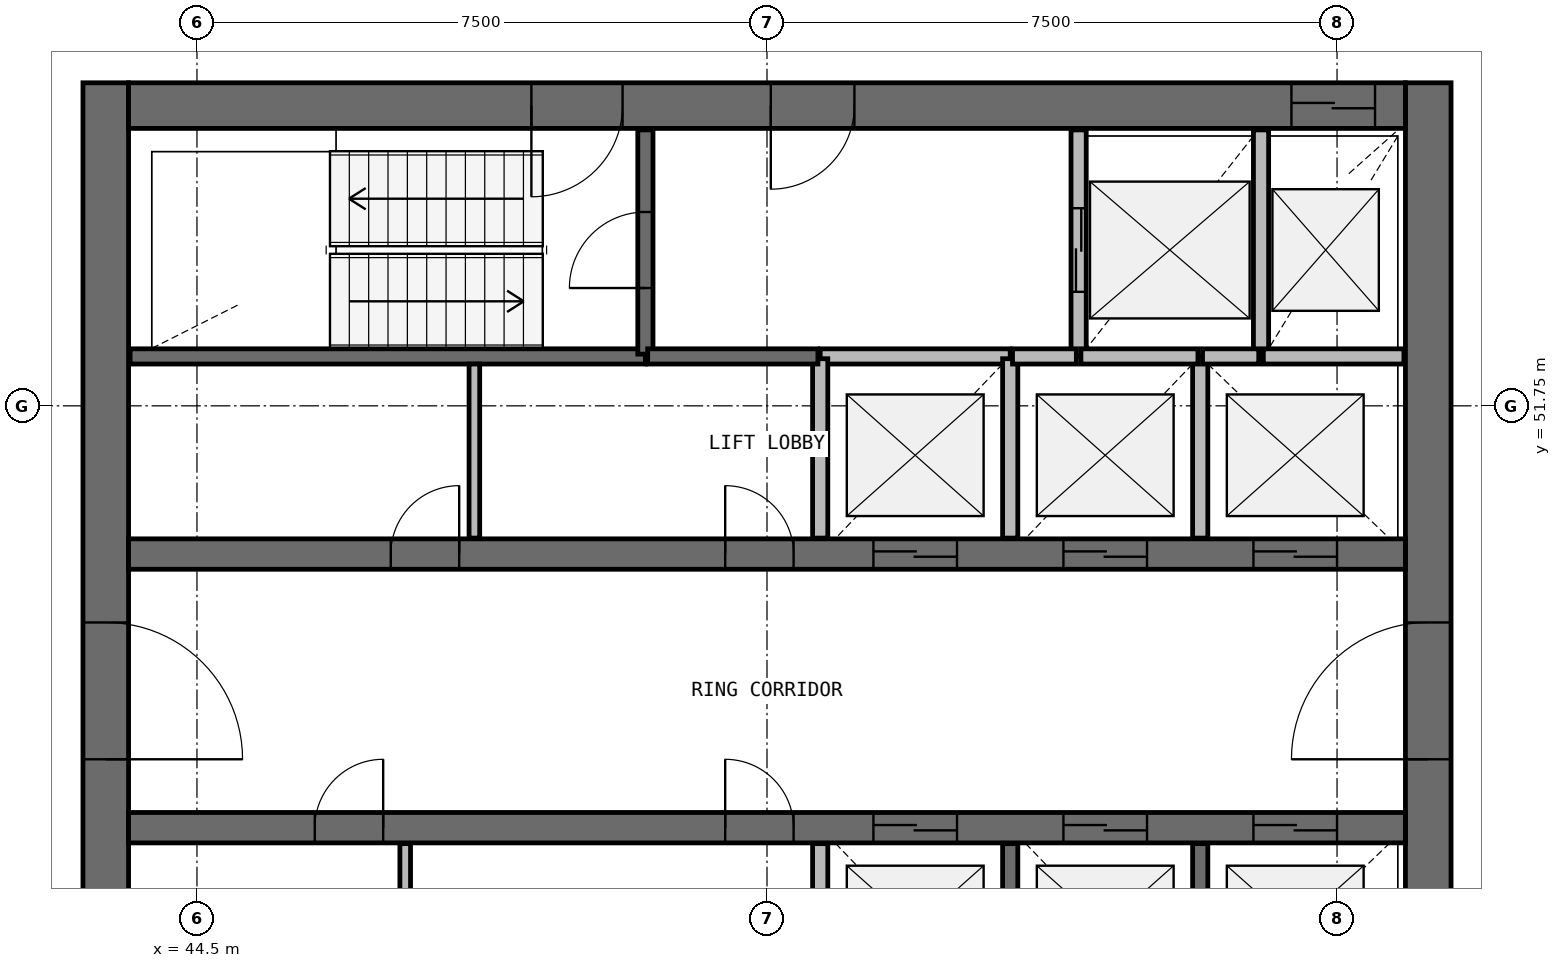
"""IFC4 building model, lengths in metres.
Left out: names, types, materials, properties, quantities, classifications, styles, units other than length and angle.
Written with IfcOpenShell. Run it as: python <this file> out.ifc"""

import sys

from ifc_helpers import new_model, si_unit, direction, frame, frame_2d, origin, place, context, subcontext, project, spatial, rectangle, extrude, source, transform, mapped, element, fill, save


model = new_model("IFC4")
c1 = context("Model", 3, precision=1e-05, world=origin(), true_north=direction((0.0, 1.0)))
c2 = subcontext(c1, "Body", "Model", "MODEL_VIEW")
j1 = project(units=[si_unit("LENGTHUNIT", "METRE"), si_unit("PLANEANGLEUNIT", "RADIAN")], contexts=[c1])
p1 = place(None, origin())
s1 = spatial("IfcSite", under=j1, at=p1, CompositionType="ELEMENT")
p2 = place(p1, origin())
s2 = spatial("IfcBuilding", under=s1, at=p2, CompositionType="ELEMENT")
p3 = place(p2, frame((0.0, 0.0, 250.1)))
s3 = spatial("IfcBuildingStorey", under=s2, at=p3, CompositionType="ELEMENT", Elevation=250.1)
p4 = place(p3, frame((60.7, 40.0, 0.0), z_axis=(0.0, 0.0, 1.0), x_axis=(0.0, 1.0, 0.0)))
e1 = element("IfcWall", 1, at=p4, inside=s3, PredefinedType="SHEAR", context=c2, shape_type="SweptSolid", body=[
    extrude(rectangle(XDim=16.0, YDim=0.6, at=frame_2d((8.0, 0.0))), origin(), (0.0, 0.0, 1.0), 3.9),
])
p5 = place(p4, frame((7.1, 0.0, 0.0)))
e2 = element("IfcOpeningElement", 2, at=p5, cuts=e1, PredefinedType="OPENING", context=c2, shape_type="SweptSolid", body=[
    extrude(rectangle(XDim=1.8, YDim=2.1, at=frame_2d((0.9, 1.05))), frame((0.0, 0.31, 0.0), z_axis=(0.0, -1.0, 0.0), x_axis=(1.0, 0.0, 0.0)), (0.0, 0.0, 1.0), 0.62),
])
p6 = place(p3, frame((43.3, 56.0, 0.0), z_axis=(0.0, 0.0, 1.0), x_axis=(0.0, -1.0, 0.0)))
e3 = element("IfcWall", 3, at=p6, inside=s3, PredefinedType="SHEAR", context=c2, shape_type="SweptSolid", body=[
    extrude(rectangle(XDim=16.0, YDim=0.6, at=frame_2d((8.0, 0.0))), origin(), (0.0, 0.0, 1.0), 3.9),
])
p7 = place(p6, frame((7.1, 0.0, 0.0)))
e4 = element("IfcOpeningElement", 4, at=p7, cuts=e3, PredefinedType="OPENING", context=c2, shape_type="SweptSolid", body=[
    extrude(rectangle(XDim=1.8, YDim=2.1, at=frame_2d((0.9, 1.05))), frame((0.0, 0.31, 0.0), z_axis=(0.0, -1.0, 0.0), x_axis=(1.0, 0.0, 0.0)), (0.0, 0.0, 1.0), 0.62),
])
p8 = place(p3, frame((60.4, 55.7, 0.0), z_axis=(0.0, 0.0, 1.0), x_axis=(-1.0, 0.0, 0.0)))
e5 = element("IfcWall", 5, at=p8, inside=s3, PredefinedType="SHEAR", context=c2, shape_type="SweptSolid", body=[
    extrude(rectangle(XDim=16.8, YDim=0.6, at=frame_2d((8.4, 0.0))), origin(), (0.0, 0.0, 1.0), 3.9),
])
p9 = place(p8, frame((0.4, 0.0, 0.0)))
e6 = element("IfcOpeningElement", 6, at=p9, cuts=e5, PredefinedType="OPENING", context=c2, shape_type="SweptSolid", body=[
    extrude(rectangle(XDim=1.1, YDim=2.1, at=frame_2d((0.55, 1.05))), frame((0.0, 0.31, 0.0), z_axis=(0.0, -1.0, 0.0), x_axis=(1.0, 0.0, 0.0)), (0.0, 0.0, 1.0), 0.62),
])
p10 = place(p8, frame((10.3, 0.0, 0.0)))
e7 = element("IfcOpeningElement", 7, at=p10, cuts=e5, PredefinedType="OPENING", context=c2, shape_type="SweptSolid", body=[
    extrude(rectangle(XDim=1.2, YDim=2.1, at=frame_2d((0.6, 1.05))), frame((0.0, 0.31, 0.0), z_axis=(0.0, -1.0, 0.0), x_axis=(1.0, 0.0, 0.0)), (0.0, 0.0, 1.0), 0.62),
])
p11 = place(p8, frame((7.25, 0.0, 0.0)))
e8 = element("IfcOpeningElement", 8, at=p11, cuts=e5, PredefinedType="OPENING", context=c2, shape_type="SweptSolid", body=[
    extrude(rectangle(XDim=1.1, YDim=2.1, at=frame_2d((0.55, 1.05))), frame((0.0, 0.31, 0.0), z_axis=(0.0, -1.0, 0.0), x_axis=(1.0, 0.0, 0.0)), (0.0, 0.0, 1.0), 0.62),
])
p12 = place(p3, frame((43.6, 49.8, 0.0), z_axis=(0.0, 0.0, 1.0), x_axis=(1.0, 0.0, 0.0)))
e9 = element("IfcWall", 9, at=p12, inside=s3, PredefinedType="SHEAR", context=c2, shape_type="SweptSolid", body=[
    extrude(rectangle(XDim=16.8, YDim=0.4, at=frame_2d((8.4, 0.0))), origin(), (0.0, 0.0, 1.0), 3.9),
])
p13 = place(p12, frame((9.8, 0.0, 0.0)))
e10 = element("IfcOpeningElement", 10, at=p13, cuts=e9, PredefinedType="OPENING", context=c2, shape_type="SweptSolid", body=[
    extrude(rectangle(XDim=1.1, YDim=2.1, at=frame_2d((0.55, 1.05))), frame((0.0, 0.21, 0.0), z_axis=(0.0, -1.0, 0.0), x_axis=(1.0, 0.0, 0.0)), (0.0, 0.0, 1.0), 0.42),
])
p14 = place(p12, frame((12.3, 0.0, 0.0)))
e11 = element("IfcOpeningElement", 11, at=p14, cuts=e9, PredefinedType="OPENING", context=c2, shape_type="SweptSolid", body=[
    extrude(rectangle(XDim=1.1, YDim=2.1, at=frame_2d((0.55, 1.05))), frame((0.0, 0.21, 0.0), z_axis=(0.0, -1.0, 0.0), x_axis=(1.0, 0.0, 0.0)), (0.0, 0.0, 1.0), 0.42),
])
p15 = place(p12, frame((14.8, 0.0, 0.0)))
e12 = element("IfcOpeningElement", 12, at=p15, cuts=e9, PredefinedType="OPENING", context=c2, shape_type="SweptSolid", body=[
    extrude(rectangle(XDim=1.1, YDim=2.1, at=frame_2d((0.55, 1.05))), frame((0.0, 0.21, 0.0), z_axis=(0.0, -1.0, 0.0), x_axis=(1.0, 0.0, 0.0)), (0.0, 0.0, 1.0), 0.42),
])
p16 = place(p12, frame((3.45, 0.0, 0.0)))
e13 = element("IfcOpeningElement", 13, at=p16, cuts=e9, PredefinedType="OPENING", context=c2, shape_type="SweptSolid", body=[
    extrude(rectangle(XDim=0.9, YDim=2.1, at=frame_2d((0.45, 1.05))), frame((0.0, 0.21, 0.0), z_axis=(0.0, -1.0, 0.0), x_axis=(1.0, 0.0, 0.0)), (0.0, 0.0, 1.0), 0.42),
])
p17 = place(p12, frame((7.85, 0.0, 0.0)))
e14 = element("IfcOpeningElement", 14, at=p17, cuts=e9, PredefinedType="OPENING", context=c2, shape_type="SweptSolid", body=[
    extrude(rectangle(XDim=0.9, YDim=2.1, at=frame_2d((0.45, 1.05))), frame((0.0, 0.21, 0.0), z_axis=(0.0, -1.0, 0.0), x_axis=(1.0, 0.0, 0.0)), (0.0, 0.0, 1.0), 0.42),
])
p18 = place(p3, frame((43.6, 46.2, 0.0), z_axis=(0.0, 0.0, 1.0), x_axis=(1.0, 0.0, 0.0)))
e15 = element("IfcWall", 15, at=p18, inside=s3, PredefinedType="SHEAR", context=c2, shape_type="SweptSolid", body=[
    extrude(rectangle(XDim=16.8, YDim=0.4, at=frame_2d((8.4, 0.0))), origin(), (0.0, 0.0, 1.0), 3.9),
])
p19 = place(p18, frame((9.8, 0.0, 0.0)))
e16 = element("IfcOpeningElement", 16, at=p19, cuts=e15, PredefinedType="OPENING", context=c2, shape_type="SweptSolid", body=[
    extrude(rectangle(XDim=1.1, YDim=2.1, at=frame_2d((0.55, 1.05))), frame((0.0, 0.21, 0.0), z_axis=(0.0, -1.0, 0.0), x_axis=(1.0, 0.0, 0.0)), (0.0, 0.0, 1.0), 0.42),
])
p20 = place(p18, frame((12.3, 0.0, 0.0)))
e17 = element("IfcOpeningElement", 17, at=p20, cuts=e15, PredefinedType="OPENING", context=c2, shape_type="SweptSolid", body=[
    extrude(rectangle(XDim=1.1, YDim=2.1, at=frame_2d((0.55, 1.05))), frame((0.0, 0.21, 0.0), z_axis=(0.0, -1.0, 0.0), x_axis=(1.0, 0.0, 0.0)), (0.0, 0.0, 1.0), 0.42),
])
p21 = place(p18, frame((14.8, 0.0, 0.0)))
e18 = element("IfcOpeningElement", 18, at=p21, cuts=e15, PredefinedType="OPENING", context=c2, shape_type="SweptSolid", body=[
    extrude(rectangle(XDim=1.1, YDim=2.1, at=frame_2d((0.55, 1.05))), frame((0.0, 0.21, 0.0), z_axis=(0.0, -1.0, 0.0), x_axis=(1.0, 0.0, 0.0)), (0.0, 0.0, 1.0), 0.42),
])
p22 = place(p18, frame((2.45, 0.0, 0.0)))
e19 = element("IfcOpeningElement", 19, at=p22, cuts=e15, PredefinedType="OPENING", context=c2, shape_type="SweptSolid", body=[
    extrude(rectangle(XDim=0.9, YDim=2.1, at=frame_2d((0.45, 1.05))), frame((0.0, 0.21, 0.0), z_axis=(0.0, -1.0, 0.0), x_axis=(1.0, 0.0, 0.0)), (0.0, 0.0, 1.0), 0.42),
])
p23 = place(p18, frame((7.85, 0.0, 0.0)))
e20 = element("IfcOpeningElement", 20, at=p23, cuts=e15, PredefinedType="OPENING", context=c2, shape_type="SweptSolid", body=[
    extrude(rectangle(XDim=0.9, YDim=2.1, at=frame_2d((0.45, 1.05))), frame((0.0, 0.21, 0.0), z_axis=(0.0, -1.0, 0.0), x_axis=(1.0, 0.0, 0.0)), (0.0, 0.0, 1.0), 0.42),
])
p24 = place(p3, frame((43.62, 52.4, 0.0), z_axis=(0.0, 0.0, 1.0), x_axis=(1.0, 0.0, 0.0)))
e21 = element("IfcWall", 21, at=p24, inside=s3, PredefinedType="SOLIDWALL", context=c2, shape_type="SweptSolid", body=[
    extrude(rectangle(XDim=6.78, YDim=0.2, at=frame_2d((3.39, 0.0))), origin(), (0.0, 0.0, 1.0), 3.58),
])
p25 = place(p3, frame((50.4, 52.43, 0.0), z_axis=(0.0, 0.0, 1.0), x_axis=(0.0, 1.0, 0.0)))
e22 = element("IfcWall", 22, at=p25, inside=s3, PredefinedType="SOLIDWALL", context=c2, shape_type="SweptSolid", body=[
    extrude(rectangle(XDim=2.95, YDim=0.2, at=frame_2d((1.475, 0.0))), origin(), (0.0, 0.0, 1.0), 3.58),
])
p26 = place(p25, frame((0.87, 0.0, 0.0)))
e23 = element("IfcOpeningElement", 23, at=p26, cuts=e22, PredefinedType="OPENING", context=c2, shape_type="SweptSolid", body=[
    extrude(rectangle(XDim=1.0, YDim=2.1, at=frame_2d((0.5, 1.05))), frame((0.0, 0.11, 0.0), z_axis=(0.0, -1.0, 0.0), x_axis=(1.0, 0.0, 0.0)), (0.0, 0.0, 1.0), 0.22),
])
p27 = place(p3, frame((56.1, 55.38, 0.0), z_axis=(0.0, 0.0, 1.0), x_axis=(0.0, -1.0, 0.0)))
e24 = element("IfcWall", 24, at=p27, inside=s3, PredefinedType="SOLIDWALL", context=c2, shape_type="SweptSolid", body=[
    extrude(rectangle(XDim=2.98, YDim=0.2, at=frame_2d((1.49, 0.0))), origin(), (0.0, 0.0, 1.0), 3.58),
])
p28 = place(p27, frame((1.03, 0.0, 0.0)))
e25 = element("IfcOpeningElement", 25, at=p28, cuts=e24, PredefinedType="OPENING", context=c2, shape_type="SweptSolid", body=[
    extrude(rectangle(XDim=1.1, YDim=2.1, at=frame_2d((0.55, 1.05))), frame((0.0, 0.11, 0.0), z_axis=(0.0, -1.0, 0.0), x_axis=(1.0, 0.0, 0.0)), (0.0, 0.0, 1.0), 0.22),
])
p29 = place(p3, frame((58.5, 52.4, 0.0), z_axis=(0.0, 0.0, 1.0), x_axis=(0.0, 1.0, 0.0)))
e26 = element("IfcWall", 26, at=p29, inside=s3, PredefinedType="SOLIDWALL", context=c2, shape_type="SweptSolid", body=[
    extrude(rectangle(XDim=2.98, YDim=0.2, at=frame_2d((1.49, 0.0))), origin(), (0.0, 0.0, 1.0), 3.58),
])
p30 = place(p3, frame((55.2, 52.4, 0.0), z_axis=(0.0, 0.0, 1.0), x_axis=(-1.0, 0.0, 0.0)))
e27 = element("IfcWall", 27, at=p30, inside=s3, PredefinedType="SOLIDWALL", context=c2, shape_type="SweptSolid", body=[
    extrude(rectangle(XDim=2.5, YDim=0.2, at=frame_2d((1.25, 0.0))), origin(), (0.0, 0.0, 1.0), 3.58),
])
for number, where, z_axis, x_axis in (
    (28, (52.7, 45.99, 0.0), (0.0, 0.0, 1.0), (0.0, -1.0, 0.0)),
    (29, (52.7, 52.37, 0.0), (0.0, 0.0, 1.0), (0.0, -1.0, 0.0)),
    (30, (55.2, 43.63, 0.0), (0.0, 0.0, 1.0), (0.0, 1.0, 0.0)),
    (31, (55.2, 50.01, 0.0), (0.0, 0.0, 1.0), (0.0, 1.0, 0.0)),
    (32, (57.7, 43.63, 0.0), (0.0, 0.0, 1.0), (0.0, 1.0, 0.0)),
):
    element("IfcWall", number, at=place(p3, frame(where, z_axis=z_axis, x_axis=x_axis)), inside=s3, PredefinedType="SOLIDWALL", context=c2, shape_type="SweptSolid", body=[
        extrude(rectangle(XDim=2.36, YDim=0.2, at=frame_2d((1.18, 0.0))), origin(), (0.0, 0.0, 1.0), 3.58),
    ])
p31 = place(p3, frame((57.7, 50.01, 0.0), z_axis=(0.0, 0.0, 1.0), x_axis=(0.0, 1.0, 0.0)))
e33 = element("IfcWall", 33, at=p31, inside=s3, PredefinedType="SOLIDWALL", context=c2, shape_type="SweptSolid", body=[
    extrude(rectangle(XDim=2.39, YDim=0.2, at=frame_2d((1.195, 0.0))), origin(), (0.0, 0.0, 1.0), 3.58),
])
p32 = place(p3, frame((50.43, 52.4, 0.0), z_axis=(0.0, 0.0, 1.0), x_axis=(1.0, 0.0, 0.0)))
e34 = element("IfcWall", 34, at=p32, inside=s3, PredefinedType="SOLIDWALL", context=c2, shape_type="SweptSolid", body=[
    extrude(rectangle(XDim=2.24, YDim=0.2, at=frame_2d((1.12, 0.0))), origin(), (0.0, 0.0, 1.0), 3.58),
])
p33 = place(p3, frame((60.38, 52.4, 0.0), z_axis=(0.0, 0.0, 1.0), x_axis=(-1.0, 0.0, 0.0)))
e35 = element("IfcWall", 35, at=p33, inside=s3, PredefinedType="SOLIDWALL", context=c2, shape_type="SweptSolid", body=[
    extrude(rectangle(XDim=1.85, YDim=0.2, at=frame_2d((0.925, 0.0))), origin(), (0.0, 0.0, 1.0), 3.58),
])
p34 = place(p3, frame((57.67, 52.4, 0.0), z_axis=(0.0, 0.0, 1.0), x_axis=(-1.0, 0.0, 0.0)))
e36 = element("IfcWall", 36, at=p34, inside=s3, PredefinedType="SOLIDWALL", context=c2, shape_type="SweptSolid", body=[
    extrude(rectangle(XDim=1.54, YDim=0.2, at=frame_2d((0.77, 0.0))), origin(), (0.0, 0.0, 1.0), 3.58),
])
p35 = place(p3, frame((56.07, 52.4, 0.0), z_axis=(0.0, 0.0, 1.0), x_axis=(-1.0, 0.0, 0.0)))
e37 = element("IfcWall", 37, at=p35, inside=s3, PredefinedType="SOLIDWALL", context=c2, shape_type="SweptSolid", body=[
    extrude(rectangle(XDim=0.84, YDim=0.2, at=frame_2d((0.42, 0.0))), origin(), (0.0, 0.0, 1.0), 3.58),
])
p36 = place(p3, frame((58.47, 52.4, 0.0), z_axis=(0.0, 0.0, 1.0), x_axis=(-1.0, 0.0, 0.0)))
e38 = element("IfcWall", 38, at=p36, inside=s3, PredefinedType="SOLIDWALL", context=c2, shape_type="SweptSolid", body=[
    extrude(rectangle(XDim=0.74, YDim=0.2, at=frame_2d((0.37, 0.0))), origin(), (0.0, 0.0, 1.0), 3.58),
])
for number, where, z_axis, x_axis in (
    (39, (47.24, 43.7, 0.0), (0.0, 0.0, 1.0), (0.0, 1.0, 0.0)),
    (40, (48.15, 50.01, 0.0), (0.0, 0.0, 1.0), (0.0, 1.0, 0.0)),
):
    element("IfcWall", number, at=place(p3, frame(where, z_axis=z_axis, x_axis=x_axis)), inside=s3, PredefinedType="PARTITIONING", context=c2, shape_type="SweptSolid", body=[
        extrude(rectangle(XDim=2.29, YDim=0.14, at=frame_2d((1.145, 0.0))), origin(), (0.0, 0.0, 1.0), 2.88),
    ])
m1 = source(origin(), c2, "Body", "SweptSolid", [
    extrude(rectangle(XDim=1.8, YDim=2.1, at=frame_2d((0.9, 1.05))), frame((0.0, 0.025, 0.0), z_axis=(0.0, -1.0, 0.0), x_axis=(1.0, 0.0, 0.0)), (0.0, 0.0, 1.0), 0.05),
])
p37 = place(p7, origin())
e41 = element("IfcDoor", 41, at=p37, inside=s3, OperationType="SINGLE_SWING_RIGHT", PredefinedType="DOOR", context=c2, shape_type="MappedRepresentation", body=[
    mapped(m1, transform((0.0, 0.0, 0.0), scale=1.0)),
])
fill(e4, e41)
p38 = place(p5, origin())
e42 = element("IfcDoor", 42, at=p38, inside=s3, OperationType="SINGLE_SWING_LEFT", PredefinedType="DOOR", context=c2, shape_type="MappedRepresentation", body=[
    mapped(m1, transform((0.0, 0.0, 0.0), scale=1.0)),
])
fill(e2, e42)
m2 = source(origin(), c2, "Body", "SweptSolid", [
    extrude(rectangle(XDim=1.1, YDim=2.1, at=frame_2d((0.55, 1.05))), frame((0.0, 0.025, 0.0), z_axis=(0.0, -1.0, 0.0), x_axis=(1.0, 0.0, 0.0)), (0.0, 0.0, 1.0), 0.05),
])
p39 = place(p13, origin())
e43 = element("IfcDoor", 43, at=p39, inside=s3, OperationType="DOUBLE_DOOR_SLIDING", PredefinedType="USERDEFINED", context=c2, shape_type="MappedRepresentation", body=[
    mapped(m2, transform((0.0, 0.0, 0.0), scale=1.0)),
])
fill(e10, e43)
p40 = place(p14, origin())
e44 = element("IfcDoor", 44, at=p40, inside=s3, OperationType="DOUBLE_DOOR_SLIDING", PredefinedType="USERDEFINED", context=c2, shape_type="MappedRepresentation", body=[
    mapped(m2, transform((0.0, 0.0, 0.0), scale=1.0)),
])
fill(e11, e44)
p41 = place(p15, origin())
e45 = element("IfcDoor", 45, at=p41, inside=s3, OperationType="DOUBLE_DOOR_SLIDING", PredefinedType="USERDEFINED", context=c2, shape_type="MappedRepresentation", body=[
    mapped(m2, transform((0.0, 0.0, 0.0), scale=1.0)),
])
fill(e12, e45)
p42 = place(p19, origin())
e46 = element("IfcDoor", 46, at=p42, inside=s3, OperationType="DOUBLE_DOOR_SLIDING", PredefinedType="USERDEFINED", context=c2, shape_type="MappedRepresentation", body=[
    mapped(m2, transform((0.0, 0.0, 0.0), scale=1.0)),
])
fill(e16, e46)
p43 = place(p20, origin())
e47 = element("IfcDoor", 47, at=p43, inside=s3, OperationType="DOUBLE_DOOR_SLIDING", PredefinedType="USERDEFINED", context=c2, shape_type="MappedRepresentation", body=[
    mapped(m2, transform((0.0, 0.0, 0.0), scale=1.0)),
])
fill(e17, e47)
p44 = place(p21, origin())
e48 = element("IfcDoor", 48, at=p44, inside=s3, OperationType="DOUBLE_DOOR_SLIDING", PredefinedType="USERDEFINED", context=c2, shape_type="MappedRepresentation", body=[
    mapped(m2, transform((0.0, 0.0, 0.0), scale=1.0)),
])
fill(e18, e48)
p45 = place(p28, origin())
e49 = element("IfcDoor", 49, at=p45, inside=s3, OperationType="DOUBLE_DOOR_SLIDING", PredefinedType="USERDEFINED", context=c2, shape_type="MappedRepresentation", body=[
    mapped(m2, transform((0.0, 0.0, 0.0), scale=1.0)),
])
fill(e25, e49)
p46 = place(p9, origin())
e50 = element("IfcDoor", 50, at=p46, inside=s3, OperationType="DOUBLE_DOOR_SLIDING", PredefinedType="USERDEFINED", context=c2, shape_type="MappedRepresentation", body=[
    mapped(m2, transform((0.0, 0.0, 0.0), scale=1.0)),
])
fill(e6, e50)
m3 = source(origin(), c2, "Body", "SweptSolid", [
    extrude(rectangle(XDim=1.2, YDim=2.1, at=frame_2d((0.6, 1.05))), frame((0.0, 0.025, 0.0), z_axis=(0.0, -1.0, 0.0), x_axis=(1.0, 0.0, 0.0)), (0.0, 0.0, 1.0), 0.05),
])
p47 = place(p10, origin())
e51 = element("IfcDoor", 51, at=p47, inside=s3, OperationType="SINGLE_SWING_RIGHT", PredefinedType="DOOR", context=c2, shape_type="MappedRepresentation", body=[
    mapped(m3, transform((0.0, 0.0, 0.0), scale=1.0)),
])
fill(e7, e51)
m4 = source(origin(), c2, "Body", "SweptSolid", [
    extrude(rectangle(XDim=1.0, YDim=2.1, at=frame_2d((0.5, 1.05))), frame((0.0, 0.025, 0.0), z_axis=(0.0, -1.0, 0.0), x_axis=(1.0, 0.0, 0.0)), (0.0, 0.0, 1.0), 0.05),
])
p48 = place(p26, origin())
e52 = element("IfcDoor", 52, at=p48, inside=s3, OperationType="SINGLE_SWING_LEFT", PredefinedType="DOOR", context=c2, shape_type="MappedRepresentation", body=[
    mapped(m4, transform((0.0, 0.0, 0.0), scale=1.0)),
])
fill(e23, e52)
m5 = source(origin(), c2, "Body", "SweptSolid", [
    extrude(rectangle(XDim=1.1, YDim=2.1, at=frame_2d((0.55, 1.05))), frame((0.0, 0.025, 0.0), z_axis=(0.0, -1.0, 0.0), x_axis=(1.0, 0.0, 0.0)), (0.0, 0.0, 1.0), 0.05),
])
p49 = place(p11, origin())
e53 = element("IfcDoor", 53, at=p49, inside=s3, OperationType="SINGLE_SWING_RIGHT", PredefinedType="DOOR", context=c2, shape_type="MappedRepresentation", body=[
    mapped(m5, transform((0.0, 0.0, 0.0), scale=1.0)),
])
fill(e8, e53)
m6 = source(origin(), c2, "Body", "SweptSolid", [
    extrude(rectangle(XDim=0.9, YDim=2.1, at=frame_2d((0.45, 1.05))), frame((0.0, 0.025, 0.0), z_axis=(0.0, -1.0, 0.0), x_axis=(1.0, 0.0, 0.0)), (0.0, 0.0, 1.0), 0.05),
])
p50 = place(p16, origin())
e54 = element("IfcDoor", 54, at=p50, inside=s3, OperationType="SINGLE_SWING_RIGHT", PredefinedType="DOOR", context=c2, shape_type="MappedRepresentation", body=[
    mapped(m6, transform((0.0, 0.0, 0.0), scale=1.0)),
])
fill(e13, e54)
p51 = place(p17, origin())
e55 = element("IfcDoor", 55, at=p51, inside=s3, OperationType="SINGLE_SWING_LEFT", PredefinedType="DOOR", context=c2, shape_type="MappedRepresentation", body=[
    mapped(m6, transform((0.0, 0.0, 0.0), scale=1.0)),
])
fill(e14, e55)
p52 = place(p22, origin())
e56 = element("IfcDoor", 56, at=p52, inside=s3, OperationType="SINGLE_SWING_RIGHT", PredefinedType="DOOR", context=c2, shape_type="MappedRepresentation", body=[
    mapped(m6, transform((0.0, 0.0, 0.0), scale=1.0)),
])
fill(e19, e56)
p53 = place(p23, origin())
e57 = element("IfcDoor", 57, at=p53, inside=s3, OperationType="SINGLE_SWING_LEFT", PredefinedType="DOOR", context=c2, shape_type="MappedRepresentation", body=[
    mapped(m6, transform((0.0, 0.0, 0.0), scale=1.0)),
])
fill(e20, e57)
save(model, sys.argv[1])
